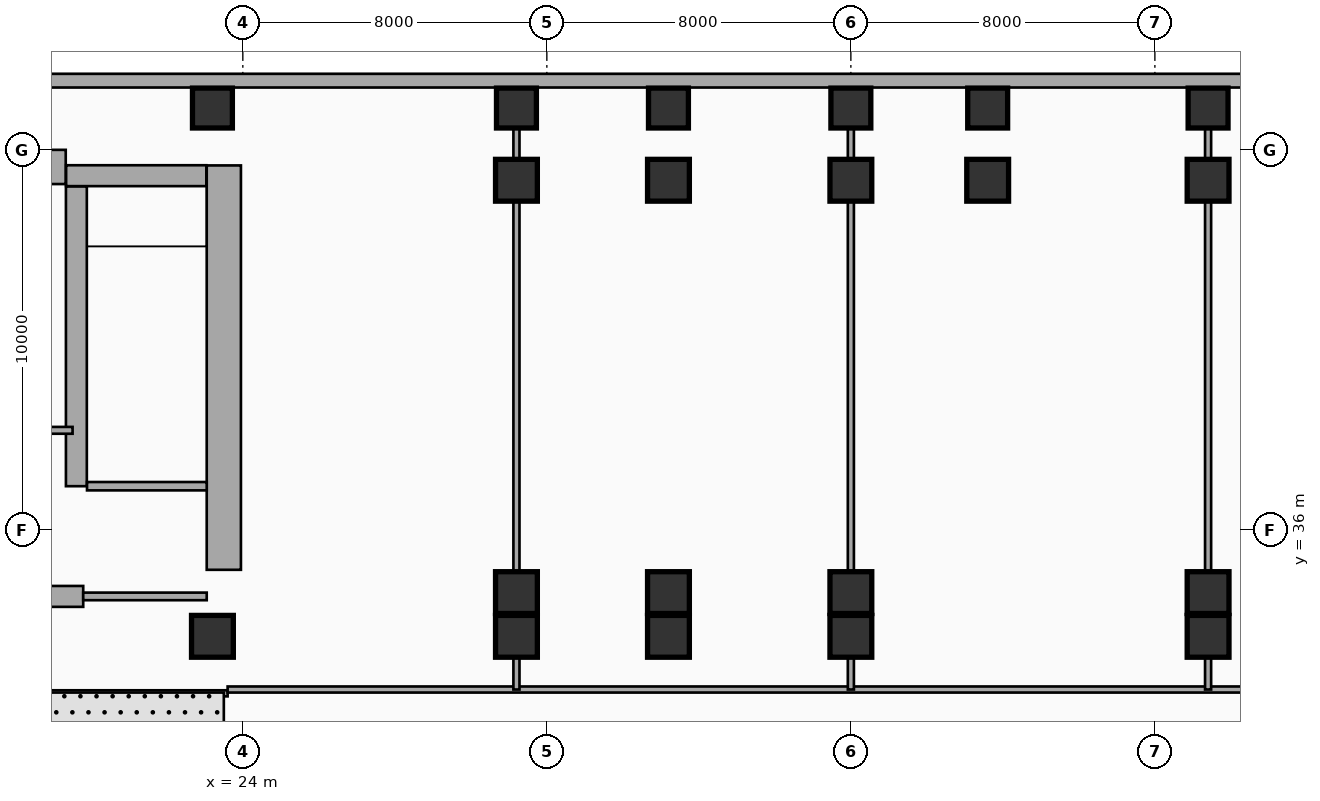
"""IFC4 building model, lengths in metres.
Left out: names, types, materials, properties, quantities, classifications, styles, units other than length and angle.
Written with IfcOpenShell. Run it as: python <this file> out.ifc"""

import sys

from ifc_helpers import new_model, si_unit, direction, frame, frame_2d, origin, origin_2d, place, context, subcontext, project, spatial, rectangle, extrude, element, fill, save


model = new_model("IFC4")
c1 = context("Model", 3, precision=1e-05, world=origin(), true_north=direction((0.0, 1.0)))
c2 = subcontext(c1, "Body", "Model", "MODEL_VIEW")
j1 = project(units=[si_unit("LENGTHUNIT", "METRE"), si_unit("PLANEANGLEUNIT", "RADIAN")], contexts=[c1])
p1 = place(None, origin())
s1 = spatial("IfcSite", under=j1, at=p1, CompositionType="ELEMENT")
p2 = place(p1, origin())
s2 = spatial("IfcBuilding", under=s1, at=p2, CompositionType="ELEMENT")
p3 = place(p2, origin())
s3 = spatial("IfcBuildingStorey", under=s2, at=p3, CompositionType="ELEMENT", Elevation=0.0)
p4 = place(p3, frame((5.36, 45.55, 0.0), z_axis=(0.0, 0.0, 1.0), x_axis=(1.0, 0.0, 0.0)))
e1 = element("IfcWall", 1, at=p4, inside=s3, PredefinedType="SHEAR", context=c2, shape_type="SweptSolid", body=[
    extrude(rectangle(XDim=13.98, YDim=0.9, at=frame_2d((6.99, 0.0))), origin(), (0.0, 0.0, 1.0), 5.94),
])
p5 = place(p3, frame((23.5, 34.95, 0.0), z_axis=(0.0, 0.0, 1.0), x_axis=(0.0, 1.0, 0.0)))
e2 = element("IfcWall", 2, at=p5, inside=s3, PredefinedType="SHEAR", context=c2, shape_type="SweptSolid", body=[
    extrude(rectangle(XDim=10.64, YDim=0.9, at=frame_2d((5.32, 0.0))), origin(), (0.0, 0.0, 1.0), 5.94),
])
p6 = place(p3, frame((13.68, 34.25, 0.0), z_axis=(0.0, 0.0, 1.0), x_axis=(1.0, 0.0, 0.0)))
e3 = element("IfcWall", 3, at=p6, inside=s3, PredefinedType="SHEAR", context=c2, shape_type="SweptSolid", body=[
    extrude(rectangle(XDim=6.12, YDim=0.55, at=frame_2d((3.06, 0.0))), origin(), (0.0, 0.0, 1.0), 5.94),
])
p7 = place(p3, frame((19.62, 37.15, 0.0), z_axis=(0.0, 0.0, 1.0), x_axis=(0.0, 1.0, 0.0)))
e4 = element("IfcWall", 4, at=p7, inside=s3, PredefinedType="SHEAR", context=c2, shape_type="SweptSolid", body=[
    extrude(rectangle(XDim=7.89, YDim=0.55, at=frame_2d((3.945, 0.0))), origin(), (0.0, 0.0, 1.0), 5.94),
])
p8 = place(p3, frame((19.35, 45.32, 0.0), z_axis=(0.0, 0.0, 1.0), x_axis=(1.0, 0.0, 0.0)))
e5 = element("IfcWall", 5, at=p8, inside=s3, PredefinedType="SHEAR", context=c2, shape_type="SweptSolid", body=[
    extrude(rectangle(XDim=3.69, YDim=0.55, at=frame_2d((1.845, 0.0))), origin(), (0.0, 0.0, 1.0), 5.94),
])
p9 = place(p3, frame((23.2, 33.2, 0.0), z_axis=(0.0, 0.0, 1.0), x_axis=(1.0, 0.0, 0.0)))
e6 = element("IfcColumn", 6, at=p9, inside=s3, PredefinedType="COLUMN", context=c2, shape_type="SweptSolid", body=[
    extrude(rectangle(XDim=1.1, YDim=1.1, at=origin_2d()), origin(), (0.0, 0.0, 1.0), 5.94),
])
p10 = place(p3, frame((23.2, 47.1, 0.0), z_axis=(0.0, 0.0, 1.0), x_axis=(1.0, 0.0, 0.0)))
e7 = element("IfcColumn", 7, at=p10, inside=s3, PredefinedType="COLUMN", context=c2, shape_type="SweptSolid", body=[
    extrude(rectangle(XDim=1.05, YDim=1.05, at=origin_2d()), origin(), (0.0, 0.0, 1.0), 5.94),
])
for number, where, z_axis, x_axis in (
    (8, (31.2, 33.2, 0.0), (0.0, 0.0, 1.0), (1.0, 0.0, 0.0)),
    (9, (31.2, 34.35, 0.0), (0.0, 0.0, 1.0), (1.0, 0.0, 0.0)),
    (10, (31.2, 45.2, 0.0), (0.0, 0.0, 1.0), (1.0, 0.0, 0.0)),
):
    element("IfcColumn", number, at=place(p3, frame(where, z_axis=z_axis, x_axis=x_axis)), inside=s3, PredefinedType="COLUMN", context=c2, shape_type="SweptSolid", body=[
        extrude(rectangle(XDim=1.1, YDim=1.1, at=origin_2d()), origin(), (0.0, 0.0, 1.0), 5.94),
    ])
p11 = place(p3, frame((31.2, 47.1, 0.0), z_axis=(0.0, 0.0, 1.0), x_axis=(1.0, 0.0, 0.0)))
e11 = element("IfcColumn", 11, at=p11, inside=s3, PredefinedType="COLUMN", context=c2, shape_type="SweptSolid", body=[
    extrude(rectangle(XDim=1.05, YDim=1.05, at=origin_2d()), origin(), (0.0, 0.0, 1.0), 5.94),
])
for number, where, z_axis, x_axis in (
    (12, (35.2, 33.2, 0.0), (0.0, 0.0, 1.0), (1.0, 0.0, 0.0)),
    (13, (35.2, 34.35, 0.0), (0.0, 0.0, 1.0), (1.0, 0.0, 0.0)),
    (14, (35.2, 45.2, 0.0), (0.0, 0.0, 1.0), (1.0, 0.0, 0.0)),
):
    element("IfcColumn", number, at=place(p3, frame(where, z_axis=z_axis, x_axis=x_axis)), inside=s3, PredefinedType="COLUMN", context=c2, shape_type="SweptSolid", body=[
        extrude(rectangle(XDim=1.1, YDim=1.1, at=origin_2d()), origin(), (0.0, 0.0, 1.0), 5.94),
    ])
p12 = place(p3, frame((35.2, 47.1, 0.0), z_axis=(0.0, 0.0, 1.0), x_axis=(1.0, 0.0, 0.0)))
e15 = element("IfcColumn", 15, at=p12, inside=s3, PredefinedType="COLUMN", context=c2, shape_type="SweptSolid", body=[
    extrude(rectangle(XDim=1.05, YDim=1.05, at=origin_2d()), origin(), (0.0, 0.0, 1.0), 5.94),
])
for number, where, z_axis, x_axis in (
    (16, (40.0, 33.2, 0.0), (0.0, 0.0, 1.0), (1.0, 0.0, 0.0)),
    (17, (40.0, 34.35, 0.0), (0.0, 0.0, 1.0), (1.0, 0.0, 0.0)),
    (18, (40.0, 45.2, 0.0), (0.0, 0.0, 1.0), (1.0, 0.0, 0.0)),
):
    element("IfcColumn", number, at=place(p3, frame(where, z_axis=z_axis, x_axis=x_axis)), inside=s3, PredefinedType="COLUMN", context=c2, shape_type="SweptSolid", body=[
        extrude(rectangle(XDim=1.1, YDim=1.1, at=origin_2d()), origin(), (0.0, 0.0, 1.0), 5.94),
    ])
p13 = place(p3, frame((40.0, 47.1, 0.0), z_axis=(0.0, 0.0, 1.0), x_axis=(1.0, 0.0, 0.0)))
e19 = element("IfcColumn", 19, at=p13, inside=s3, PredefinedType="COLUMN", context=c2, shape_type="SweptSolid", body=[
    extrude(rectangle(XDim=1.05, YDim=1.05, at=origin_2d()), origin(), (0.0, 0.0, 1.0), 5.94),
])
p14 = place(p3, frame((43.6, 45.2, 0.0), z_axis=(0.0, 0.0, 1.0), x_axis=(1.0, 0.0, 0.0)))
e20 = element("IfcColumn", 20, at=p14, inside=s3, PredefinedType="COLUMN", context=c2, shape_type="SweptSolid", body=[
    extrude(rectangle(XDim=1.1, YDim=1.1, at=origin_2d()), origin(), (0.0, 0.0, 1.0), 5.94),
])
p15 = place(p3, frame((43.6, 47.1, 0.0), z_axis=(0.0, 0.0, 1.0), x_axis=(1.0, 0.0, 0.0)))
e21 = element("IfcColumn", 21, at=p15, inside=s3, PredefinedType="COLUMN", context=c2, shape_type="SweptSolid", body=[
    extrude(rectangle(XDim=1.05, YDim=1.05, at=origin_2d()), origin(), (0.0, 0.0, 1.0), 5.94),
])
for number, where, z_axis, x_axis in (
    (22, (49.4, 33.2, 0.0), (0.0, 0.0, 1.0), (1.0, 0.0, 0.0)),
    (23, (49.4, 34.35, 0.0), (0.0, 0.0, 1.0), (1.0, 0.0, 0.0)),
    (24, (49.4, 45.2, 0.0), (0.0, 0.0, 1.0), (1.0, 0.0, 0.0)),
):
    element("IfcColumn", number, at=place(p3, frame(where, z_axis=z_axis, x_axis=x_axis)), inside=s3, PredefinedType="COLUMN", context=c2, shape_type="SweptSolid", body=[
        extrude(rectangle(XDim=1.1, YDim=1.1, at=origin_2d()), origin(), (0.0, 0.0, 1.0), 5.94),
    ])
p16 = place(p3, frame((49.4, 47.1, 0.0), z_axis=(0.0, 0.0, 1.0), x_axis=(1.0, 0.0, 0.0)))
e25 = element("IfcColumn", 25, at=p16, inside=s3, PredefinedType="COLUMN", context=c2, shape_type="SweptSolid", body=[
    extrude(rectangle(XDim=1.05, YDim=1.05, at=origin_2d()), origin(), (0.0, 0.0, 1.0), 5.94),
])
p17 = place(p3, frame((78.945, 47.82, 0.0), z_axis=(0.0, 0.0, 1.0), x_axis=(-1.0, 0.0, 0.0)))
e26 = element("IfcWall", 26, at=p17, inside=s3, PredefinedType="SOLIDWALL", context=c2, shape_type="SweptSolid", body=[
    extrude(rectangle(XDim=77.89, YDim=0.36, at=frame_2d((38.945, 0.0))), origin(), (0.0, 0.0, 1.0), 5.62),
])
p18 = place(p17, frame((22.145, 0.0, 0.0), z_axis=(0.0, 0.0, 1.0), x_axis=(-1.0, 0.0, 0.0)))
e27 = element("IfcOpeningElement", 27, at=p18, cuts=e26, PredefinedType="OPENING", context=c2, shape_type="SweptSolid", body=[
    extrude(rectangle(XDim=4.8, YDim=2.6, at=frame_2d((2.4, 1.3))), frame((0.0, 0.19, 0.0), z_axis=(0.0, -1.0, 0.0), x_axis=(1.0, 0.0, 0.0)), (0.0, 0.0, 1.0), 0.38),
])
p19 = place(p17, frame((11.545, 0.0, 0.0), z_axis=(0.0, 0.0, 1.0), x_axis=(-1.0, 0.0, 0.0)))
e28 = element("IfcOpeningElement", 28, at=p19, cuts=e26, PredefinedType="OPENING", context=c2, shape_type="SweptSolid", body=[
    extrude(rectangle(XDim=4.0, YDim=3.2, at=frame_2d((2.0, 1.6))), frame((0.0, 0.19, 0.0), z_axis=(0.0, -1.0, 0.0), x_axis=(1.0, 0.0, 0.0)), (0.0, 0.0, 1.0), 0.38),
])
p20 = place(p17, frame((52.445, 0.0, 0.0), z_axis=(0.0, 0.0, 1.0), x_axis=(-1.0, 0.0, 0.0)))
e29 = element("IfcOpeningElement", 29, at=p20, cuts=e26, PredefinedType="OPENING", context=c2, shape_type="SweptSolid", body=[
    extrude(rectangle(XDim=1.8, YDim=2.4, at=frame_2d((0.9, 1.2))), frame((0.0, 0.19, 0.0), z_axis=(0.0, -1.0, 0.0), x_axis=(1.0, 0.0, 0.0)), (0.0, 0.0, 1.0), 0.38),
])
p21 = place(p3, frame((19.9, 37.15, 0.0), z_axis=(0.0, 0.0, 1.0), x_axis=(1.0, 0.0, 0.0)))
e30 = element("IfcWall", 30, at=p21, inside=s3, PredefinedType="PARTITIONING", context=c2, shape_type="SweptSolid", body=[
    extrude(rectangle(XDim=3.15, YDim=0.22, at=frame_2d((1.575, 0.0))), origin(), (0.0, 0.0, 1.0), 5.62),
])
p22 = place(p21, frame((2.05, 0.0, 0.0), z_axis=(0.0, 0.0, 1.0), x_axis=(-1.0, 0.0, 0.0)))
e31 = element("IfcOpeningElement", 31, at=p22, cuts=e30, PredefinedType="OPENING", context=c2, shape_type="SweptSolid", body=[
    extrude(rectangle(XDim=1.05, YDim=2.15, at=frame_2d((0.525, 1.075))), frame((0.0, 0.12, 0.0), z_axis=(0.0, -1.0, 0.0), x_axis=(1.0, 0.0, 0.0)), (0.0, 0.0, 1.0), 0.24),
])
p23 = place(p3, frame((19.8, 34.25, 0.0), z_axis=(0.0, 0.0, 1.0), x_axis=(1.0, 0.0, 0.0)))
e32 = element("IfcWall", 32, at=p23, inside=s3, PredefinedType="PARTITIONING", context=c2, shape_type="SweptSolid", body=[
    extrude(rectangle(XDim=3.25, YDim=0.2, at=frame_2d((1.625, 0.0))), origin(), (0.0, 0.0, 1.0), 5.62),
])
p24 = place(p23, frame((2.15, 0.0, 0.0), z_axis=(0.0, 0.0, 1.0), x_axis=(-1.0, 0.0, 0.0)))
e33 = element("IfcOpeningElement", 33, at=p24, cuts=e32, PredefinedType="OPENING", context=c2, shape_type="SweptSolid", body=[
    extrude(rectangle(XDim=1.1, YDim=2.15, at=frame_2d((0.55, 1.075))), frame((0.0, 0.11, 0.0), z_axis=(0.0, -1.0, 0.0), x_axis=(1.0, 0.0, 0.0)), (0.0, 0.0, 1.0), 0.22),
])
p25 = place(p3, frame((17.68, 38.62, 0.0), z_axis=(0.0, 0.0, 1.0), x_axis=(1.0, 0.0, 0.0)))
e34 = element("IfcWall", 34, at=p25, inside=s3, PredefinedType="PARTITIONING", context=c2, shape_type="SweptSolid", body=[
    extrude(rectangle(XDim=1.84, YDim=0.18, at=frame_2d((0.92, 0.0))), origin(), (0.0, 0.0, 1.0), 5.62),
])
p26 = place(p25, frame((0.24, 0.0, 0.0)))
e35 = element("IfcOpeningElement", 35, at=p26, cuts=e34, PredefinedType="OPENING", context=c2, shape_type="SweptSolid", body=[
    extrude(rectangle(XDim=0.92, YDim=2.1, at=frame_2d((0.46, 1.05))), frame((0.0, 0.1, 0.0), z_axis=(0.0, -1.0, 0.0), x_axis=(1.0, 0.0, 0.0)), (0.0, 0.0, 1.0), 0.2),
])
p27 = place(p3, frame((5.5, 31.7, 0.0), z_axis=(0.0, 0.0, 1.0), x_axis=(1.0, 0.0, 0.0)))
e36 = element("IfcWall", 36, at=p27, inside=s3, PredefinedType="PARTITIONING", context=c2, shape_type="SweptSolid", body=[
    extrude(rectangle(XDim=18.1, YDim=0.16, at=frame_2d((9.05, 0.0))), origin(), (0.0, 0.0, 1.0), 5.62),
])
p28 = place(p27, frame((0.45, 0.0, 0.0)))
e37 = element("IfcOpeningElement", 37, at=p28, cuts=e36, PredefinedType="OPENING", context=c2, shape_type="SweptSolid", body=[
    extrude(rectangle(XDim=1.1, YDim=2.15, at=frame_2d((0.55, 1.075))), frame((0.0, 0.09, 0.0), z_axis=(0.0, -1.0, 0.0), x_axis=(1.0, 0.0, 0.0)), (0.0, 0.0, 1.0), 0.18),
])
p29 = place(p27, frame((9.5, 0.0, 0.0)))
e38 = element("IfcOpeningElement", 38, at=p29, cuts=e36, PredefinedType="OPENING", context=c2, shape_type="SweptSolid", body=[
    extrude(rectangle(XDim=1.8, YDim=2.3, at=frame_2d((0.9, 1.15))), frame((0.0, 0.09, 0.0), z_axis=(0.0, -1.0, 0.0), x_axis=(1.0, 0.0, 0.0)), (0.0, 0.0, 1.0), 0.18),
])
p30 = place(p3, frame((23.6, 31.8, 0.0), z_axis=(0.0, 0.0, 1.0), x_axis=(1.0, 0.0, 0.0)))
e39 = element("IfcWall", 39, at=p30, inside=s3, PredefinedType="PARTITIONING", context=c2, shape_type="SweptSolid", body=[
    extrude(rectangle(XDim=32.0, YDim=0.16, at=frame_2d((16.0, 0.0))), origin(), (0.0, 0.0, 1.0), 5.62),
])
p31 = place(p30, frame((3.0, 0.0, 0.0)))
e40 = element("IfcOpeningElement", 40, at=p31, cuts=e39, PredefinedType="OPENING", context=c2, shape_type="SweptSolid", body=[
    extrude(rectangle(XDim=1.8, YDim=2.3, at=frame_2d((0.9, 1.15))), frame((0.0, 0.09, 0.0), z_axis=(0.0, -1.0, 0.0), x_axis=(1.0, 0.0, 0.0)), (0.0, 0.0, 1.0), 0.18),
])
p32 = place(p30, frame((9.5, 0.0, 0.0)))
e41 = element("IfcOpeningElement", 41, at=p32, cuts=e39, PredefinedType="OPENING", context=c2, shape_type="SweptSolid", body=[
    extrude(rectangle(XDim=0.95, YDim=2.15, at=frame_2d((0.475, 1.075))), frame((0.0, 0.09, 0.0), z_axis=(0.0, -1.0, 0.0), x_axis=(1.0, 0.0, 0.0)), (0.0, 0.0, 1.0), 0.18),
])
p33 = place(p30, frame((20.0, 0.0, 0.0)))
e42 = element("IfcOpeningElement", 42, at=p33, cuts=e39, PredefinedType="OPENING", context=c2, shape_type="SweptSolid", body=[
    extrude(rectangle(XDim=1.8, YDim=2.3, at=frame_2d((0.9, 1.15))), frame((0.0, 0.09, 0.0), z_axis=(0.0, -1.0, 0.0), x_axis=(1.0, 0.0, 0.0)), (0.0, 0.0, 1.0), 0.18),
])
for number, where, z_axis, x_axis in (
    (43, (31.2, 31.8, 0.0), (0.0, 0.0, 1.0), (0.0, 1.0, 0.0)),
    (44, (40.0, 31.8, 0.0), (0.0, 0.0, 1.0), (0.0, 1.0, 0.0)),
    (45, (49.4, 31.8, 0.0), (0.0, 0.0, 1.0), (0.0, 1.0, 0.0)),
):
    element("IfcWall", number, at=place(p3, frame(where, z_axis=z_axis, x_axis=x_axis)), inside=s3, PredefinedType="PARTITIONING", context=c2, shape_type="SweptSolid", body=[
        extrude(rectangle(XDim=15.84, YDim=0.16, at=frame_2d((7.92, 0.0))), origin(), (0.0, 0.0, 1.0), 4.805),
    ])
p34 = place(p20, origin())
e46 = element("IfcDoor", 46, at=p34, inside=s3, OperationType="DOUBLE_DOOR_SINGLE_SWING", PredefinedType="DOOR", context=c2, shape_type="SweptSolid", body=[
    extrude(rectangle(XDim=1.8, YDim=2.4, at=frame_2d((0.9, 1.2))), frame((0.0, 0.025, 0.0), z_axis=(0.0, -1.0, 0.0), x_axis=(1.0, 0.0, 0.0)), (0.0, 0.0, 1.0), 0.05),
])
fill(e29, e46)
p35 = place(p22, origin())
e47 = element("IfcDoor", 47, at=p35, inside=s3, OperationType="SINGLE_SWING_RIGHT", PredefinedType="DOOR", context=c2, shape_type="SweptSolid", body=[
    extrude(rectangle(XDim=1.05, YDim=2.15, at=frame_2d((0.525, 1.075))), frame((0.0, 0.025, 0.0), z_axis=(0.0, -1.0, 0.0), x_axis=(1.0, 0.0, 0.0)), (0.0, 0.0, 1.0), 0.05),
])
fill(e31, e47)
p36 = place(p24, origin())
e48 = element("IfcDoor", 48, at=p36, inside=s3, OperationType="SINGLE_SWING_LEFT", PredefinedType="DOOR", context=c2, shape_type="SweptSolid", body=[
    extrude(rectangle(XDim=1.1, YDim=2.15, at=frame_2d((0.55, 1.075))), frame((0.0, 0.025, 0.0), z_axis=(0.0, -1.0, 0.0), x_axis=(1.0, 0.0, 0.0)), (0.0, 0.0, 1.0), 0.05),
])
fill(e33, e48)
p37 = place(p31, origin())
e49 = element("IfcDoor", 49, at=p37, inside=s3, OperationType="SINGLE_SWING_LEFT", PredefinedType="DOOR", context=c2, shape_type="SweptSolid", body=[
    extrude(rectangle(XDim=1.8, YDim=2.3, at=frame_2d((0.9, 1.15))), frame((0.0, 0.025, 0.0), z_axis=(0.0, -1.0, 0.0), x_axis=(1.0, 0.0, 0.0)), (0.0, 0.0, 1.0), 0.05),
])
fill(e40, e49)
p38 = place(p32, origin())
e50 = element("IfcDoor", 50, at=p38, inside=s3, OperationType="SINGLE_SWING_RIGHT", PredefinedType="DOOR", context=c2, shape_type="SweptSolid", body=[
    extrude(rectangle(XDim=0.95, YDim=2.15, at=frame_2d((0.475, 1.075))), frame((0.0, 0.025, 0.0), z_axis=(0.0, -1.0, 0.0), x_axis=(1.0, 0.0, 0.0)), (0.0, 0.0, 1.0), 0.05),
])
fill(e41, e50)
p39 = place(p33, origin())
e51 = element("IfcDoor", 51, at=p39, inside=s3, OperationType="SINGLE_SWING_LEFT", PredefinedType="DOOR", context=c2, shape_type="SweptSolid", body=[
    extrude(rectangle(XDim=1.8, YDim=2.3, at=frame_2d((0.9, 1.15))), frame((0.0, 0.025, 0.0), z_axis=(0.0, -1.0, 0.0), x_axis=(1.0, 0.0, 0.0)), (0.0, 0.0, 1.0), 0.05),
])
fill(e42, e51)
save(model, sys.argv[1])
